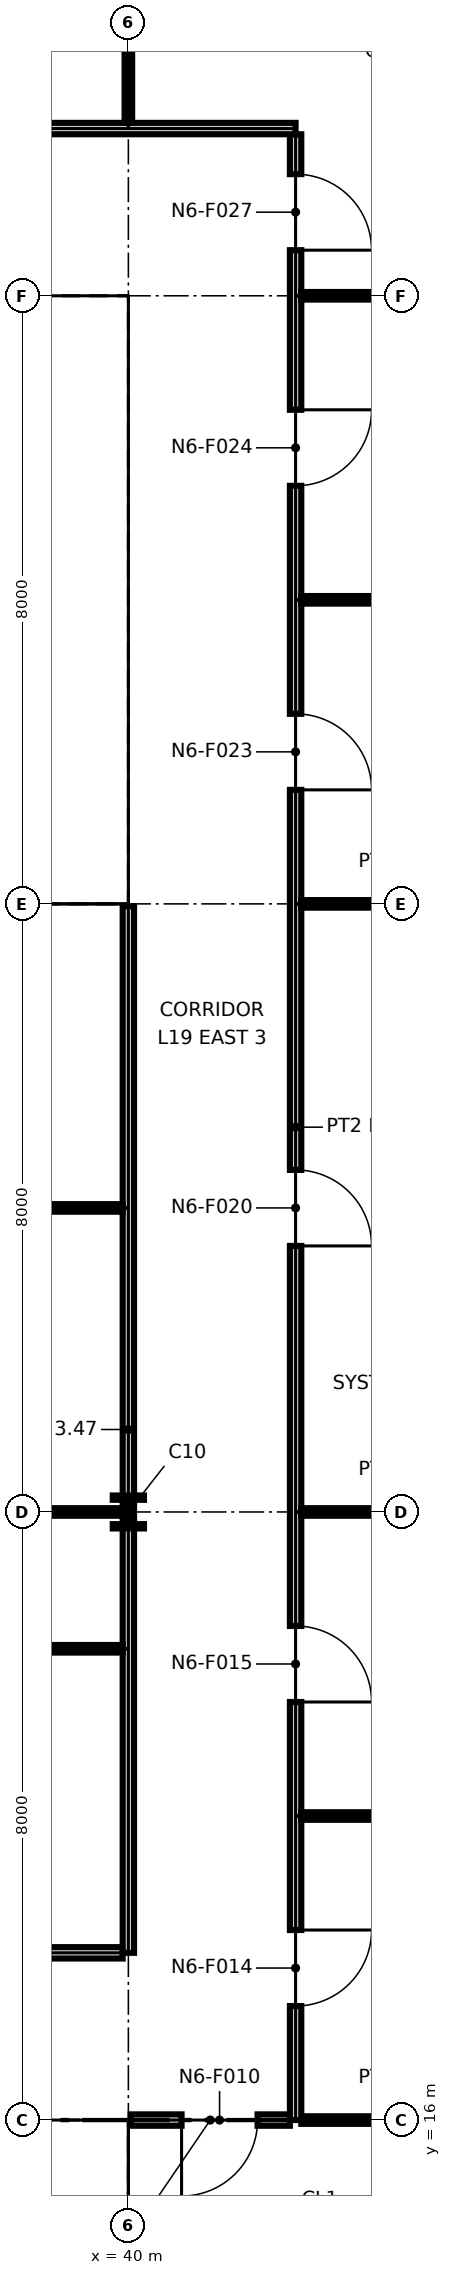
"""IFC4 building model, lengths in metres.
Left out: names, types, materials, properties, quantities, classifications, styles, units other than length and angle.
Written with IfcOpenShell. Run it as: python <this file> out.ifc"""

import sys

from ifc_helpers import new_model, si_unit, direction, frame, frame_2d, origin, origin_2d, place, context, subcontext, project, spatial, polyline, rectangle, i_section, outline, extrude, element, fill, save


model = new_model("IFC4")
c1 = context("Model", 3, precision=1e-05, world=origin(), true_north=direction((0.0, 1.0)))
c2 = subcontext(c1, "Body", "Model", "MODEL_VIEW")
j1 = project(units=[si_unit("LENGTHUNIT", "METRE"), si_unit("PLANEANGLEUNIT", "RADIAN")], contexts=[c1])
p1 = place(None, origin())
s1 = spatial("IfcSite", under=j1, at=p1, CompositionType="ELEMENT")
p2 = place(p1, origin())
s2 = spatial("IfcBuilding", under=s1, at=p2, CompositionType="ELEMENT")
p3 = place(p2, frame((0.0, 0.0, 100.8)))
s3 = spatial("IfcBuildingStorey", under=s2, at=p3, CompositionType="ELEMENT", Elevation=100.8)
p4 = place(p3, frame((40.0, 16.0, 0.0), z_axis=(0.0, 0.0, 1.0), x_axis=(1.0, 0.0, 0.0)))
e1 = element("IfcColumn", 1, at=p4, inside=s3, PredefinedType="COLUMN", context=c2, shape_type="SweptSolid", body=[
    extrude(i_section(OverallWidth=0.406, OverallDepth=0.417, WebThickness=0.03, FlangeThickness=0.048, at=origin_2d()), origin(), (0.0, 0.0, 1.0), 4.25),
])
p5 = place(p3, frame((40.0, 24.0, 0.0), z_axis=(0.0, 0.0, 1.0), x_axis=(1.0, 0.0, 0.0)))
e2 = element("IfcColumn", 2, at=p5, inside=s3, PredefinedType="COLUMN", context=c2, shape_type="SweptSolid", body=[
    extrude(i_section(OverallWidth=0.411, OverallDepth=0.434, WebThickness=0.036, FlangeThickness=0.057, at=origin_2d()), origin(), (0.0, 0.0, 1.0), 4.25),
])
for number, where, z_axis, x_axis in (
    (3, (40.0, 32.0, 0.0), (0.0, 0.0, 1.0), (1.0, 0.0, 0.0)),
    (4, (40.0, 40.0, 0.0), (0.0, 0.0, 1.0), (1.0, 0.0, 0.0)),
):
    element("IfcColumn", number, at=place(p3, frame(where, z_axis=z_axis, x_axis=x_axis)), inside=s3, PredefinedType="COLUMN", context=c2, shape_type="SweptSolid", body=[
        extrude(i_section(OverallWidth=0.257, OverallDepth=0.363, WebThickness=0.013, FlangeThickness=0.022, at=origin_2d()), origin(), (0.0, 0.0, 1.0), 4.25),
    ])
p6 = place(p3, frame((24.65, 15.25, 0.0), z_axis=(0.0, 0.0, 1.0), x_axis=(1.0, 0.0, 0.0)))
e5 = element("IfcWall", 5, at=p6, inside=s3, PredefinedType="PARTITIONING", context=c2, shape_type="SweptSolid", body=[
    extrude(outline(polyline([(0.0, 0.0), (14.7, 0.0), (14.7, 4.25), (7.469, 4.25), (7.469, 3.632), (7.231, 3.632), (7.23, 4.25), (0.0, 4.25), (0.0, 0.0)])), frame((0.0, 0.1, 0.0), z_axis=(0.0, -1.0, 0.0), x_axis=(1.0, 0.0, 0.0)), (0.0, 0.0, 1.0), 0.2),
])
p7 = place(p6, frame((2.85, 0.0, 0.0)))
e6 = element("IfcOpeningElement", 6, at=p7, cuts=e5, PredefinedType="OPENING", context=c2, shape_type="SweptSolid", body=[
    extrude(rectangle(XDim=1.8, YDim=2.1, at=frame_2d((0.9, 1.05))), frame((0.0, 0.11, 0.0), z_axis=(0.0, -1.0, 0.0), x_axis=(1.0, 0.0, 0.0)), (0.0, 0.0, 1.0), 0.22),
])
p8 = place(p6, frame((9.95, 0.0, 0.0), z_axis=(0.0, 0.0, 1.0), x_axis=(-1.0, 0.0, 0.0)))
e7 = element("IfcOpeningElement", 7, at=p8, cuts=e5, PredefinedType="OPENING", context=c2, shape_type="SweptSolid", body=[
    extrude(rectangle(XDim=1.4, YDim=2.1, at=frame_2d((0.7, 1.05))), frame((0.0, 0.11, 0.0), z_axis=(0.0, -1.0, 0.0), x_axis=(1.0, 0.0, 0.0)), (0.0, 0.0, 1.0), 0.22),
])
p9 = place(p6, frame((13.4, 0.0, 0.0), z_axis=(0.0, 0.0, 1.0), x_axis=(-1.0, 0.0, 0.0)))
e8 = element("IfcOpeningElement", 8, at=p9, cuts=e5, PredefinedType="OPENING", context=c2, shape_type="SweptSolid", body=[
    extrude(rectangle(XDim=1.4, YDim=2.1, at=frame_2d((0.7, 1.05))), frame((0.0, 0.11, 0.0), z_axis=(0.0, -1.0, 0.0), x_axis=(1.0, 0.0, 0.0)), (0.0, 0.0, 1.0), 0.22),
])
p10 = place(p3, frame((39.25, 8.85, 0.0), z_axis=(0.0, 0.0, 1.0), x_axis=(0.0, 1.0, 0.0)))
e9 = element("IfcWall", 9, at=p10, inside=s3, PredefinedType="PARTITIONING", context=c2, shape_type="SweptSolid", body=[
    extrude(rectangle(XDim=6.3, YDim=0.2, at=frame_2d((3.15, 0.0))), origin(), (0.0, 0.0, 1.0), 4.25),
])
p11 = place(p3, frame((24.65, 32.75, 0.0), z_axis=(0.0, 0.0, 1.0), x_axis=(1.0, 0.0, 0.0)))
e10 = element("IfcWall", 10, at=p11, inside=s3, PredefinedType="PARTITIONING", context=c2, shape_type="SweptSolid", body=[
    extrude(outline(polyline([(0.0, 0.0), (14.7, 0.0), (14.7, 4.25), (7.469, 4.25), (7.469, 3.632), (7.231, 3.632), (7.23, 4.25), (0.0, 4.25), (0.0, 0.0)])), frame((0.0, 0.1, 0.0), z_axis=(0.0, -1.0, 0.0), x_axis=(1.0, 0.0, 0.0)), (0.0, 0.0, 1.0), 0.2),
])
p12 = place(p11, frame((4.1, 0.0, 0.0)))
e11 = element("IfcOpeningElement", 11, at=p12, cuts=e10, PredefinedType="OPENING", context=c2, shape_type="SweptSolid", body=[
    extrude(rectangle(XDim=1.8, YDim=2.1, at=frame_2d((0.9, 1.05))), frame((0.0, 0.11, 0.0), z_axis=(0.0, -1.0, 0.0), x_axis=(1.0, 0.0, 0.0)), (0.0, 0.0, 1.0), 0.22),
])
p13 = place(p11, frame((8.55, 0.0, 0.0)))
e12 = element("IfcOpeningElement", 12, at=p13, cuts=e10, PredefinedType="OPENING", context=c2, shape_type="SweptSolid", body=[
    extrude(rectangle(XDim=1.4, YDim=2.1, at=frame_2d((0.7, 1.05))), frame((0.0, 0.11, 0.0), z_axis=(0.0, -1.0, 0.0), x_axis=(1.0, 0.0, 0.0)), (0.0, 0.0, 1.0), 0.22),
])
p14 = place(p11, frame((12.0, 0.0, 0.0)))
e13 = element("IfcOpeningElement", 13, at=p14, cuts=e10, PredefinedType="OPENING", context=c2, shape_type="SweptSolid", body=[
    extrude(rectangle(XDim=1.4, YDim=2.1, at=frame_2d((0.7, 1.05))), frame((0.0, 0.11, 0.0), z_axis=(0.0, -1.0, 0.0), x_axis=(1.0, 0.0, 0.0)), (0.0, 0.0, 1.0), 0.22),
])
p15 = place(p3, frame((24.65, 39.25, 0.0), z_axis=(0.0, 0.0, 1.0), x_axis=(1.0, 0.0, 0.0)))
e14 = element("IfcWall", 14, at=p15, inside=s3, PredefinedType="PARTITIONING", context=c2, shape_type="SweptSolid", body=[
    extrude(outline(polyline([(0.0, 0.0), (14.7, 0.0), (14.7, 4.25), (7.469, 4.25), (7.469, 3.632), (7.231, 3.632), (7.23, 4.25), (0.0, 4.25), (0.0, 0.0)])), frame((0.0, 0.1, 0.0), z_axis=(0.0, -1.0, 0.0), x_axis=(1.0, 0.0, 0.0)), (0.0, 0.0, 1.0), 0.2),
])
p16 = place(p3, frame((39.25, 32.85, 0.0), z_axis=(0.0, 0.0, 1.0), x_axis=(0.0, 1.0, 0.0)))
e15 = element("IfcWall", 15, at=p16, inside=s3, PredefinedType="PARTITIONING", context=c2, shape_type="SweptSolid", body=[
    extrude(rectangle(XDim=6.3, YDim=0.2, at=frame_2d((3.15, 0.0))), origin(), (0.0, 0.0, 1.0), 4.25),
])
p17 = place(p3, frame((40.03, 16.0, 0.0), z_axis=(0.0, 0.0, 1.0), x_axis=(1.0, 0.0, 0.0)))
e16 = element("IfcWall", 16, at=p17, inside=s3, PredefinedType="PARTITIONING", context=c2, shape_type="SweptSolid", body=[
    extrude(rectangle(XDim=2.095, YDim=0.15, at=frame_2d((1.047, 0.0))), origin(), (0.0, 0.0, 1.0), 3.47),
])
p18 = place(p17, frame((1.67, 0.0, 0.0), z_axis=(0.0, 0.0, 1.0), x_axis=(-1.0, 0.0, 0.0)))
e17 = element("IfcOpeningElement", 17, at=p18, cuts=e16, PredefinedType="OPENING", context=c2, shape_type="SweptSolid", body=[
    extrude(rectangle(XDim=1.0, YDim=2.1, at=frame_2d((0.5, 1.05))), frame((0.0, 0.085, 0.0), z_axis=(0.0, -1.0, 0.0), x_axis=(1.0, 0.0, 0.0)), (0.0, 0.0, 1.0), 0.17),
])
p19 = place(p3, frame((42.275, 16.0, 0.0), z_axis=(0.0, 0.0, 1.0), x_axis=(1.0, 0.0, 0.0)))
e18 = element("IfcWall", 18, at=p19, inside=s3, PredefinedType="PARTITIONING", context=c2, shape_type="SweptSolid", body=[
    extrude(rectangle(XDim=2.895, YDim=0.1, at=frame_2d((1.448, 0.0))), origin(), (0.0, 0.0, 1.0), 3.47),
])
p20 = place(p3, frame((42.2, 16.0, 0.0), z_axis=(0.0, 0.0, 1.0), x_axis=(0.0, 1.0, 0.0)))
e19 = element("IfcWall", 19, at=p20, inside=s3, PredefinedType="PARTITIONING", context=c2, shape_type="SweptSolid", body=[
    extrude(outline(polyline([(0.0, 0.0), (26.125, 0.0), (26.125, 4.25), (24.3, 4.25), (24.298, 3.47), (23.702, 3.47), (23.7, 4.25), (20.3, 4.25), (20.298, 3.47), (19.702, 3.47), (19.7, 4.25), (16.3, 4.25), (16.298, 3.47), (15.702, 3.47), (15.7, 4.25), (12.3, 4.25), (12.298, 3.47), (11.702, 3.47), (11.7, 4.25), (8.3, 4.25), (8.298, 3.47), (7.702, 3.47), (7.7, 4.25), (4.3, 4.25), (4.298, 3.47), (3.702, 3.47), (3.7, 4.25), (0.0, 4.25), (0.0, 0.0)])), frame((0.0, 0.075, 0.0), z_axis=(0.0, -1.0, 0.0), x_axis=(1.0, 0.0, 0.0)), (0.0, 0.0, 1.0), 0.15),
])
p21 = place(p20, frame((2.5, 0.0, 0.0), z_axis=(0.0, 0.0, 1.0), x_axis=(-1.0, 0.0, 0.0)))
e20 = element("IfcOpeningElement", 20, at=p21, cuts=e19, PredefinedType="OPENING", context=c2, shape_type="SweptSolid", body=[
    extrude(rectangle(XDim=1.0, YDim=2.1, at=frame_2d((0.5, 1.05))), frame((0.0, 0.085, 0.0), z_axis=(0.0, -1.0, 0.0), x_axis=(1.0, 0.0, 0.0)), (0.0, 0.0, 1.0), 0.17),
])
p22 = place(p20, frame((6.5, 0.0, 0.0), z_axis=(0.0, 0.0, 1.0), x_axis=(-1.0, 0.0, 0.0)))
e21 = element("IfcOpeningElement", 21, at=p22, cuts=e19, PredefinedType="OPENING", context=c2, shape_type="SweptSolid", body=[
    extrude(rectangle(XDim=1.0, YDim=2.1, at=frame_2d((0.5, 1.05))), frame((0.0, 0.085, 0.0), z_axis=(0.0, -1.0, 0.0), x_axis=(1.0, 0.0, 0.0)), (0.0, 0.0, 1.0), 0.17),
])
p23 = place(p20, frame((12.5, 0.0, 0.0), z_axis=(0.0, 0.0, 1.0), x_axis=(-1.0, 0.0, 0.0)))
e22 = element("IfcOpeningElement", 22, at=p23, cuts=e19, PredefinedType="OPENING", context=c2, shape_type="SweptSolid", body=[
    extrude(rectangle(XDim=1.0, YDim=2.1, at=frame_2d((0.5, 1.05))), frame((0.0, 0.085, 0.0), z_axis=(0.0, -1.0, 0.0), x_axis=(1.0, 0.0, 0.0)), (0.0, 0.0, 1.0), 0.17),
])
p24 = place(p20, frame((18.5, 0.0, 0.0), z_axis=(0.0, 0.0, 1.0), x_axis=(-1.0, 0.0, 0.0)))
e23 = element("IfcOpeningElement", 23, at=p24, cuts=e19, PredefinedType="OPENING", context=c2, shape_type="SweptSolid", body=[
    extrude(rectangle(XDim=1.0, YDim=2.1, at=frame_2d((0.5, 1.05))), frame((0.0, 0.085, 0.0), z_axis=(0.0, -1.0, 0.0), x_axis=(1.0, 0.0, 0.0)), (0.0, 0.0, 1.0), 0.17),
])
p25 = place(p20, frame((22.5, 0.0, 0.0), z_axis=(0.0, 0.0, 1.0), x_axis=(-1.0, 0.0, 0.0)))
e24 = element("IfcOpeningElement", 24, at=p25, cuts=e19, PredefinedType="OPENING", context=c2, shape_type="SweptSolid", body=[
    extrude(rectangle(XDim=1.0, YDim=2.1, at=frame_2d((0.5, 1.05))), frame((0.0, 0.085, 0.0), z_axis=(0.0, -1.0, 0.0), x_axis=(1.0, 0.0, 0.0)), (0.0, 0.0, 1.0), 0.17),
])
p26 = place(p20, frame((25.6, 0.0, 0.0), z_axis=(0.0, 0.0, 1.0), x_axis=(-1.0, 0.0, 0.0)))
e25 = element("IfcOpeningElement", 25, at=p26, cuts=e19, PredefinedType="OPENING", context=c2, shape_type="SweptSolid", body=[
    extrude(rectangle(XDim=1.0, YDim=2.1, at=frame_2d((0.5, 1.05))), frame((0.0, 0.085, 0.0), z_axis=(0.0, -1.0, 0.0), x_axis=(1.0, 0.0, 0.0)), (0.0, 0.0, 1.0), 0.17),
])
p27 = place(p3, frame((27.075, 18.2, 0.0), z_axis=(0.0, 0.0, 1.0), x_axis=(1.0, 0.0, 0.0)))
e26 = element("IfcWall", 26, at=p27, inside=s3, PredefinedType="PARTITIONING", context=c2, shape_type="SweptSolid", body=[
    extrude(rectangle(XDim=12.85, YDim=0.15, at=frame_2d((6.425, 0.0))), origin(), (0.0, 0.0, 1.0), 4.25),
])
p28 = place(p27, frame((1.925, 0.0, 0.0)))
e27 = element("IfcOpeningElement", 27, at=p28, cuts=e26, PredefinedType="OPENING", context=c2, shape_type="SweptSolid", body=[
    extrude(rectangle(XDim=1.0, YDim=2.1, at=frame_2d((0.5, 1.05))), frame((0.0, 0.085, 0.0), z_axis=(0.0, -1.0, 0.0), x_axis=(1.0, 0.0, 0.0)), (0.0, 0.0, 1.0), 0.17),
])
p29 = place(p3, frame((40.0, 18.2, 0.0), z_axis=(0.0, 0.0, 1.0), x_axis=(0.0, 1.0, 0.0)))
e28 = element("IfcWall", 28, at=p29, inside=s3, PredefinedType="PARTITIONING", context=c2, shape_type="SweptSolid", body=[
    extrude(rectangle(XDim=13.77, YDim=0.15, at=frame_2d((6.885, 0.0))), origin(), (0.0, 0.0, 1.0), 3.47),
])
p30 = place(p3, frame((42.275, 20.0, 0.0), z_axis=(0.0, 0.0, 1.0), x_axis=(1.0, 0.0, 0.0)))
e29 = element("IfcWall", 29, at=p30, inside=s3, PredefinedType="PARTITIONING", context=c2, shape_type="SweptSolid", body=[
    extrude(rectangle(XDim=5.595, YDim=0.1, at=frame_2d((2.798, 0.0))), origin(), (0.0, 0.0, 1.0), 3.47),
])
p31 = place(p3, frame((27.075, 22.2, 0.0), z_axis=(0.0, 0.0, 1.0), x_axis=(1.0, 0.0, 0.0)))
e30 = element("IfcWall", 30, at=p31, inside=s3, PredefinedType="PARTITIONING", context=c2, shape_type="SweptSolid", body=[
    extrude(rectangle(XDim=12.85, YDim=0.1, at=frame_2d((6.425, 0.0))), origin(), (0.0, 0.0, 1.0), 4.25),
])
p32 = place(p31, frame((6.925, 0.0, 0.0), z_axis=(0.0, 0.0, 1.0), x_axis=(-1.0, 0.0, 0.0)))
e31 = element("IfcOpeningElement", 31, at=p32, cuts=e30, PredefinedType="OPENING", context=c2, shape_type="SweptSolid", body=[
    extrude(rectangle(XDim=1.0, YDim=2.1, at=frame_2d((0.5, 1.05))), frame((0.0, 0.06, 0.0), z_axis=(0.0, -1.0, 0.0), x_axis=(1.0, 0.0, 0.0)), (0.0, 0.0, 1.0), 0.12),
])
p33 = place(p3, frame((27.075, 24.0, 0.0), z_axis=(0.0, 0.0, 1.0), x_axis=(1.0, 0.0, 0.0)))
e32 = element("IfcWall", 32, at=p33, inside=s3, PredefinedType="PARTITIONING", context=c2, shape_type="SweptSolid", body=[
    extrude(rectangle(XDim=12.85, YDim=0.1, at=frame_2d((6.425, 0.0))), origin(), (0.0, 0.0, 1.0), 3.47),
])
p34 = place(p3, frame((42.275, 24.0, 0.0), z_axis=(0.0, 0.0, 1.0), x_axis=(1.0, 0.0, 0.0)))
e33 = element("IfcWall", 33, at=p34, inside=s3, PredefinedType="PARTITIONING", context=c2, shape_type="SweptSolid", body=[
    extrude(rectangle(XDim=2.895, YDim=0.1, at=frame_2d((1.448, 0.0))), origin(), (0.0, 0.0, 1.0), 3.47),
])
p35 = place(p3, frame((27.075, 28.0, 0.0), z_axis=(0.0, 0.0, 1.0), x_axis=(1.0, 0.0, 0.0)))
e34 = element("IfcWall", 34, at=p35, inside=s3, PredefinedType="PARTITIONING", context=c2, shape_type="SweptSolid", body=[
    extrude(rectangle(XDim=12.85, YDim=0.1, at=frame_2d((6.425, 0.0))), origin(), (0.0, 0.0, 1.0), 3.47),
])
p36 = place(p3, frame((42.275, 32.0, 0.0), z_axis=(0.0, 0.0, 1.0), x_axis=(1.0, 0.0, 0.0)))
e35 = element("IfcWall", 35, at=p36, inside=s3, PredefinedType="PARTITIONING", context=c2, shape_type="SweptSolid", body=[
    extrude(rectangle(XDim=2.895, YDim=0.1, at=frame_2d((1.448, 0.0))), origin(), (0.0, 0.0, 1.0), 3.47),
])
for number, where, z_axis, x_axis in (
    (36, (42.275, 36.0, 0.0), (0.0, 0.0, 1.0), (1.0, 0.0, 0.0)),
    (37, (42.275, 40.0, 0.0), (0.0, 0.0, 1.0), (1.0, 0.0, 0.0)),
):
    element("IfcWall", number, at=place(p3, frame(where, z_axis=z_axis, x_axis=x_axis)), inside=s3, PredefinedType="PARTITIONING", context=c2, shape_type="SweptSolid", body=[
        extrude(rectangle(XDim=5.595, YDim=0.1, at=frame_2d((2.798, 0.0))), origin(), (0.0, 0.0, 1.0), 3.47),
    ])
p37 = place(p3, frame((8.05, 42.2, 0.0), z_axis=(0.0, 0.0, 1.0), x_axis=(1.0, 0.0, 0.0)))
e38 = element("IfcWall", 38, at=p37, inside=s3, PredefinedType="PARTITIONING", context=c2, shape_type="SweptSolid", body=[
    extrude(rectangle(XDim=34.15, YDim=0.15, at=frame_2d((17.075, 0.0))), origin(), (0.0, 0.0, 1.0), 4.25),
])
p38 = place(p37, frame((11.45, 0.0, 0.0)))
e39 = element("IfcOpeningElement", 39, at=p38, cuts=e38, PredefinedType="OPENING", context=c2, shape_type="SweptSolid", body=[
    extrude(rectangle(XDim=1.0, YDim=2.1, at=frame_2d((0.5, 1.05))), frame((0.0, 0.085, 0.0), z_axis=(0.0, -1.0, 0.0), x_axis=(1.0, 0.0, 0.0)), (0.0, 0.0, 1.0), 0.17),
])
p39 = place(p37, frame((27.45, 0.0, 0.0)))
e40 = element("IfcOpeningElement", 40, at=p39, cuts=e38, PredefinedType="OPENING", context=c2, shape_type="SweptSolid", body=[
    extrude(rectangle(XDim=1.0, YDim=2.1, at=frame_2d((0.5, 1.05))), frame((0.0, 0.085, 0.0), z_axis=(0.0, -1.0, 0.0), x_axis=(1.0, 0.0, 0.0)), (0.0, 0.0, 1.0), 0.17),
])
p40 = place(p37, frame((1.45, 0.0, 0.0)))
e41 = element("IfcOpeningElement", 41, at=p40, cuts=e38, PredefinedType="OPENING", context=c2, shape_type="SweptSolid", body=[
    extrude(rectangle(XDim=1.0, YDim=2.1, at=frame_2d((0.5, 1.05))), frame((0.0, 0.085, 0.0), z_axis=(0.0, -1.0, 0.0), x_axis=(1.0, 0.0, 0.0)), (0.0, 0.0, 1.0), 0.17),
])
p41 = place(p37, frame((5.45, 0.0, 0.0)))
e42 = element("IfcOpeningElement", 42, at=p41, cuts=e38, PredefinedType="OPENING", context=c2, shape_type="SweptSolid", body=[
    extrude(rectangle(XDim=1.0, YDim=2.1, at=frame_2d((0.5, 1.05))), frame((0.0, 0.085, 0.0), z_axis=(0.0, -1.0, 0.0), x_axis=(1.0, 0.0, 0.0)), (0.0, 0.0, 1.0), 0.17),
])
p42 = place(p37, frame((17.45, 0.0, 0.0)))
e43 = element("IfcOpeningElement", 43, at=p42, cuts=e38, PredefinedType="OPENING", context=c2, shape_type="SweptSolid", body=[
    extrude(rectangle(XDim=1.0, YDim=2.1, at=frame_2d((0.5, 1.05))), frame((0.0, 0.085, 0.0), z_axis=(0.0, -1.0, 0.0), x_axis=(1.0, 0.0, 0.0)), (0.0, 0.0, 1.0), 0.17),
])
p43 = place(p37, frame((21.45, 0.0, 0.0)))
e44 = element("IfcOpeningElement", 44, at=p43, cuts=e38, PredefinedType="OPENING", context=c2, shape_type="SweptSolid", body=[
    extrude(rectangle(XDim=1.0, YDim=2.1, at=frame_2d((0.5, 1.05))), frame((0.0, 0.085, 0.0), z_axis=(0.0, -1.0, 0.0), x_axis=(1.0, 0.0, 0.0)), (0.0, 0.0, 1.0), 0.17),
])
p44 = place(p3, frame((40.0, 42.275, 0.0), z_axis=(0.0, 0.0, 1.0), x_axis=(0.0, 1.0, 0.0)))
e45 = element("IfcWall", 45, at=p44, inside=s3, PredefinedType="PARTITIONING", context=c2, shape_type="SweptSolid", body=[
    extrude(rectangle(XDim=2.895, YDim=0.1, at=frame_2d((1.448, 0.0))), origin(), (0.0, 0.0, 1.0), 3.47),
])
p45 = place(p18, origin())
e46 = element("IfcDoor", 46, at=p45, inside=s3, OperationType="SINGLE_SWING_RIGHT", PredefinedType="DOOR", context=c2, shape_type="SweptSolid", body=[
    extrude(rectangle(XDim=1.0, YDim=2.1, at=frame_2d((0.5, 1.05))), frame((0.0, 0.025, 0.0), z_axis=(0.0, -1.0, 0.0), x_axis=(1.0, 0.0, 0.0)), (0.0, 0.0, 1.0), 0.05),
])
fill(e17, e46)
p46 = place(p21, origin())
e47 = element("IfcDoor", 47, at=p46, inside=s3, OperationType="SINGLE_SWING_LEFT", PredefinedType="DOOR", context=c2, shape_type="SweptSolid", body=[
    extrude(rectangle(XDim=1.0, YDim=2.1, at=frame_2d((0.5, 1.05))), frame((0.0, 0.025, 0.0), z_axis=(0.0, -1.0, 0.0), x_axis=(1.0, 0.0, 0.0)), (0.0, 0.0, 1.0), 0.05),
])
fill(e20, e47)
p47 = place(p22, origin())
e48 = element("IfcDoor", 48, at=p47, inside=s3, OperationType="SINGLE_SWING_RIGHT", PredefinedType="DOOR", context=c2, shape_type="SweptSolid", body=[
    extrude(rectangle(XDim=1.0, YDim=2.1, at=frame_2d((0.5, 1.05))), frame((0.0, 0.025, 0.0), z_axis=(0.0, -1.0, 0.0), x_axis=(1.0, 0.0, 0.0)), (0.0, 0.0, 1.0), 0.05),
])
fill(e21, e48)
p48 = place(p23, origin())
e49 = element("IfcDoor", 49, at=p48, inside=s3, OperationType="SINGLE_SWING_RIGHT", PredefinedType="DOOR", context=c2, shape_type="SweptSolid", body=[
    extrude(rectangle(XDim=1.0, YDim=2.1, at=frame_2d((0.5, 1.05))), frame((0.0, 0.025, 0.0), z_axis=(0.0, -1.0, 0.0), x_axis=(1.0, 0.0, 0.0)), (0.0, 0.0, 1.0), 0.05),
])
fill(e22, e49)
p49 = place(p24, origin())
e50 = element("IfcDoor", 50, at=p49, inside=s3, OperationType="SINGLE_SWING_RIGHT", PredefinedType="DOOR", context=c2, shape_type="SweptSolid", body=[
    extrude(rectangle(XDim=1.0, YDim=2.1, at=frame_2d((0.5, 1.05))), frame((0.0, 0.025, 0.0), z_axis=(0.0, -1.0, 0.0), x_axis=(1.0, 0.0, 0.0)), (0.0, 0.0, 1.0), 0.05),
])
fill(e23, e50)
p50 = place(p25, origin())
e51 = element("IfcDoor", 51, at=p50, inside=s3, OperationType="SINGLE_SWING_LEFT", PredefinedType="DOOR", context=c2, shape_type="SweptSolid", body=[
    extrude(rectangle(XDim=1.0, YDim=2.1, at=frame_2d((0.5, 1.05))), frame((0.0, 0.025, 0.0), z_axis=(0.0, -1.0, 0.0), x_axis=(1.0, 0.0, 0.0)), (0.0, 0.0, 1.0), 0.05),
])
fill(e24, e51)
p51 = place(p26, origin())
e52 = element("IfcDoor", 52, at=p51, inside=s3, OperationType="SINGLE_SWING_RIGHT", PredefinedType="DOOR", context=c2, shape_type="SweptSolid", body=[
    extrude(rectangle(XDim=1.0, YDim=2.1, at=frame_2d((0.5, 1.05))), frame((0.0, 0.025, 0.0), z_axis=(0.0, -1.0, 0.0), x_axis=(1.0, 0.0, 0.0)), (0.0, 0.0, 1.0), 0.05),
])
fill(e25, e52)
save(model, sys.argv[1])
